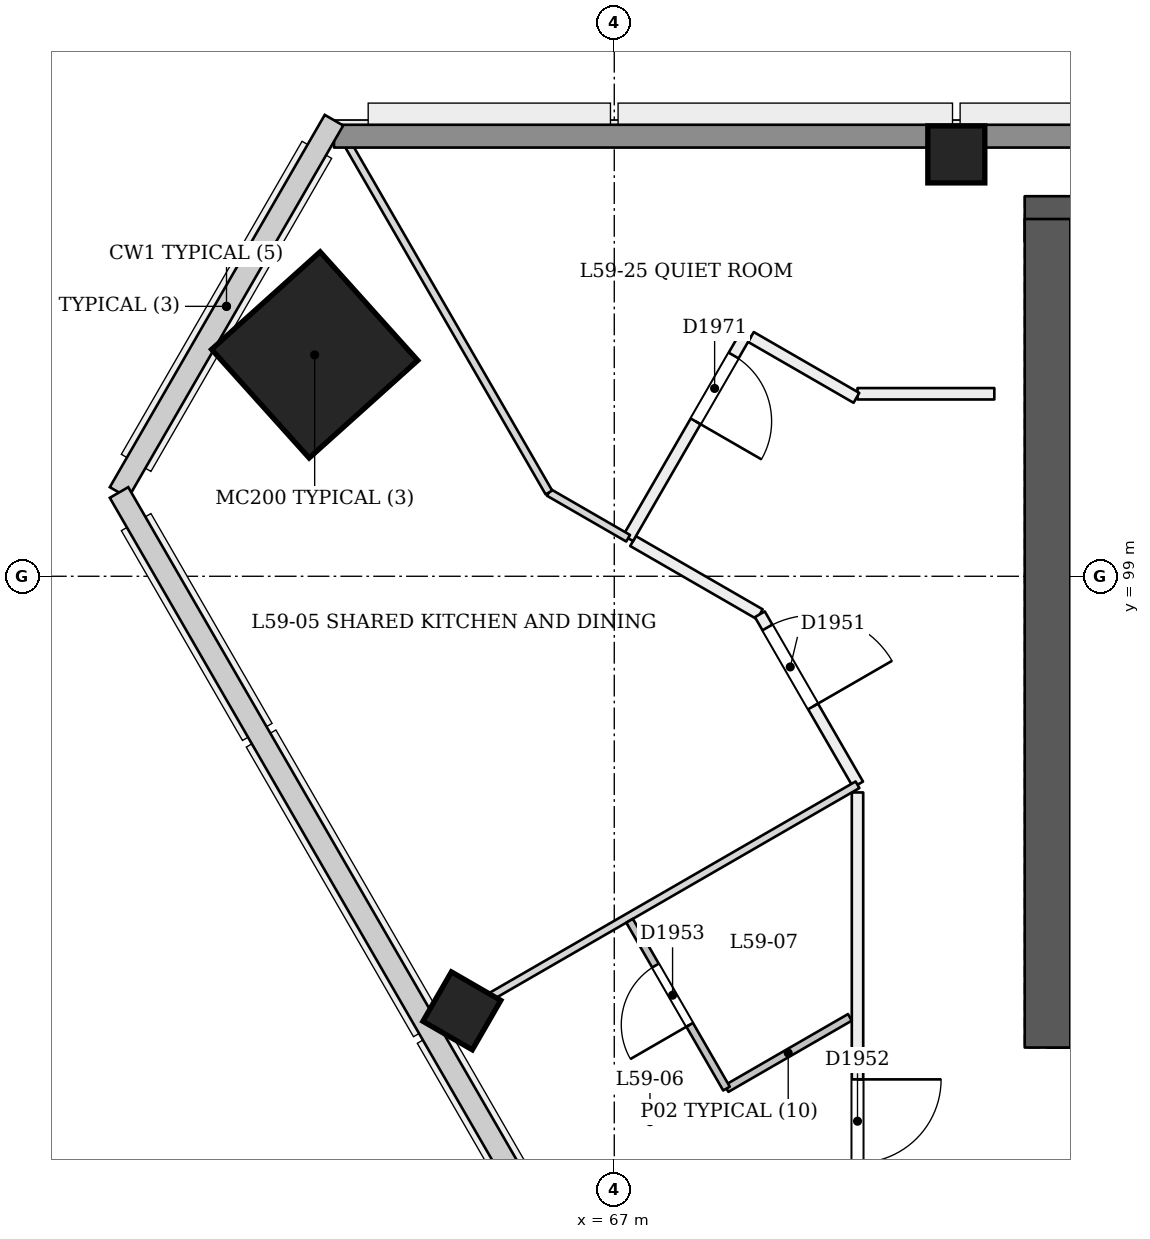
"""IFC4 building model, lengths in metres.
Left out: names, types, materials, properties, quantities, classifications, styles, units other than length and angle.
Written with IfcOpenShell. Run it as: python <this file> out.ifc"""

import sys

from ifc_helpers import new_model, si_unit, direction, frame, frame_2d, origin, origin_2d, place, context, subcontext, project, spatial, rectangle, extrude, element, fill, save


model = new_model("IFC4")
c1 = context("Model", 3, precision=1e-05, world=origin(), true_north=direction((0.0, 1.0)))
c2 = subcontext(c1, "Body", "Model", "MODEL_VIEW")
j1 = project(units=[si_unit("LENGTHUNIT", "METRE"), si_unit("PLANEANGLEUNIT", "RADIAN")], contexts=[c1])
p1 = place(None, origin())
s1 = spatial("IfcSite", under=j1, at=p1, CompositionType="ELEMENT")
p2 = place(p1, origin())
s2 = spatial("IfcBuilding", under=s1, at=p2, CompositionType="ELEMENT")
p3 = place(p2, frame((0.0, 0.0, 230.2)))
s3 = spatial("IfcBuildingStorey", under=s2, at=p3, CompositionType="ELEMENT", Elevation=230.2)
p4 = place(p3, frame((72.7, 93.1, 0.0), z_axis=(0.0, 0.0, 1.0), x_axis=(1.0, 0.0, 0.0)))
e1 = element("IfcWall", 1, at=p4, inside=s3, PredefinedType="SHEAR", context=c2, shape_type="SweptSolid", body=[
    extrude(rectangle(XDim=24.9, YDim=0.6, at=frame_2d((12.45, 0.0))), origin(), (0.0, 0.0, 1.0), 3.6),
])
p5 = place(p4, frame((1.1, 0.0, 0.0)))
e2 = element("IfcOpeningElement", 2, at=p5, cuts=e1, PredefinedType="OPENING", context=c2, shape_type="SweptSolid", body=[
    extrude(rectangle(XDim=1.2, YDim=2.1, at=frame_2d((0.6, 1.05))), frame((0.0, 0.311, 0.0), z_axis=(0.0, -1.0, 0.0), x_axis=(1.0, 0.0, 0.0)), (0.0, 0.0, 1.0), 0.621),
])
p6 = place(p4, frame((3.3, 0.0, 0.0)))
e3 = element("IfcOpeningElement", 3, at=p6, cuts=e1, PredefinedType="OPENING", context=c2, shape_type="SweptSolid", body=[
    extrude(rectangle(XDim=1.2, YDim=2.1, at=frame_2d((0.6, 1.05))), frame((0.0, 0.311, 0.0), z_axis=(0.0, -1.0, 0.0), x_axis=(1.0, 0.0, 0.0)), (0.0, 0.0, 1.0), 0.621),
])
p7 = place(p4, frame((13.3, 0.0, 0.0)))
e4 = element("IfcOpeningElement", 4, at=p7, cuts=e1, PredefinedType="OPENING", context=c2, shape_type="SweptSolid", body=[
    extrude(rectangle(XDim=1.2, YDim=2.1, at=frame_2d((0.6, 1.05))), frame((0.0, 0.311, 0.0), z_axis=(0.0, -1.0, 0.0), x_axis=(1.0, 0.0, 0.0)), (0.0, 0.0, 1.0), 0.621),
])
p8 = place(p4, frame((15.762, 0.0, 0.0)))
e5 = element("IfcOpeningElement", 5, at=p8, cuts=e1, PredefinedType="OPENING", context=c2, shape_type="SweptSolid", body=[
    extrude(rectangle(XDim=1.0, YDim=2.1, at=frame_2d((0.5, 1.05))), frame((0.0, 0.311, 0.0), z_axis=(0.0, -1.0, 0.0), x_axis=(1.0, 0.0, 0.0)), (0.0, 0.0, 1.0), 0.621),
])
p9 = place(p4, frame((18.2, 0.0, 0.0)))
e6 = element("IfcOpeningElement", 6, at=p9, cuts=e1, PredefinedType="OPENING", context=c2, shape_type="SweptSolid", body=[
    extrude(rectangle(XDim=1.0, YDim=2.1, at=frame_2d((0.5, 1.05))), frame((0.0, 0.311, 0.0), z_axis=(0.0, -1.0, 0.0), x_axis=(1.0, 0.0, 0.0)), (0.0, 0.0, 1.0), 0.621),
])
p10 = place(p4, frame((20.55, 0.0, 0.0)))
e7 = element("IfcOpeningElement", 7, at=p10, cuts=e1, PredefinedType="OPENING", context=c2, shape_type="SweptSolid", body=[
    extrude(rectangle(XDim=1.0, YDim=2.1, at=frame_2d((0.5, 1.05))), frame((0.0, 0.311, 0.0), z_axis=(0.0, -1.0, 0.0), x_axis=(1.0, 0.0, 0.0)), (0.0, 0.0, 1.0), 0.621),
])
p11 = place(p4, frame((22.837, 0.0, 0.0)))
e8 = element("IfcOpeningElement", 8, at=p11, cuts=e1, PredefinedType="OPENING", context=c2, shape_type="SweptSolid", body=[
    extrude(rectangle(XDim=1.0, YDim=2.1, at=frame_2d((0.5, 1.05))), frame((0.0, 0.311, 0.0), z_axis=(0.0, -1.0, 0.0), x_axis=(1.0, 0.0, 0.0)), (0.0, 0.0, 1.0), 0.621),
])
p12 = place(p3, frame((97.3, 103.7, 0.0), z_axis=(0.0, 0.0, 1.0), x_axis=(-1.0, 0.0, 0.0)))
e9 = element("IfcWall", 9, at=p12, inside=s3, PredefinedType="SHEAR", context=c2, shape_type="SweptSolid", body=[
    extrude(rectangle(XDim=24.9, YDim=0.6, at=frame_2d((12.45, 0.0))), origin(), (0.0, 0.0, 1.0), 3.6),
])
p13 = place(p3, frame((72.7, 103.7, 0.0), z_axis=(0.0, 0.0, 1.0), x_axis=(0.0, -1.0, 0.0)))
e10 = element("IfcWall", 10, at=p13, inside=s3, PredefinedType="SHEAR", context=c2, shape_type="SweptSolid", body=[
    extrude(rectangle(XDim=10.9, YDim=0.6, at=frame_2d((5.45, 0.0))), origin(), (0.0, 0.0, 1.0), 3.6),
])
p14 = place(p3, frame((63.024, 101.901, 0.0), z_axis=(0.028334084323, 0.009218745139, 0.999555998633), x_axis=(-0.865471577165, 0.500561960989, 0.019916634515)))
e11 = element("IfcColumn", 11, at=p14, inside=s3, PredefinedType="COLUMN", context=c2, shape_type="SweptSolid", body=[
    extrude(rectangle(XDim=1.92, YDim=1.92, at=origin_2d()), origin(), (0.0, 0.0, 1.0), 3.602),
])
p15 = place(p3, frame((71.5, 104.55, 0.0), z_axis=(0.0, 0.0, 1.0), x_axis=(1.0, 0.0, 0.0)))
e12 = element("IfcColumn", 12, at=p15, inside=s3, PredefinedType="COLUMN", context=c2, shape_type="SweptSolid", body=[
    extrude(rectangle(XDim=0.75, YDim=0.75, at=origin_2d()), origin(), (0.0, 0.0, 1.0), 3.6),
])
p16 = place(p3, frame((64.968, 93.236, -0.023), z_axis=(0.02222134892, 0.038480872521, 0.999012229206), x_axis=(-0.865639401317, -0.499186837261, 0.038482832442)))
e13 = element("IfcColumn", 13, at=p16, inside=s3, PredefinedType="COLUMN", context=c2, shape_type="SweptSolid", body=[
    extrude(rectangle(XDim=0.75, YDim=0.75, at=origin_2d()), origin(), (0.0, 0.0, 1.0), 3.604),
])
p17 = place(p3, frame((67.247, 99.463, 0.0), z_axis=(0.0, 0.0, 1.0), x_axis=(0.86605048973, -0.49995654735, 0.0)))
e14 = element("IfcWall", 14, at=p17, inside=s3, PredefinedType="PARTITIONING", context=c2, shape_type="SweptSolid", body=[
    extrude(rectangle(XDim=1.926, YDim=0.15, at=frame_2d((0.963, 0.0))), origin(), (0.0, 0.0, 1.0), 3.2),
])
p18 = place(p3, frame((68.915, 98.5, 0.0), z_axis=(0.0, 0.0, 1.0), x_axis=(0.499948666432, -0.866055039205, 0.0)))
e15 = element("IfcWall", 15, at=p18, inside=s3, PredefinedType="PARTITIONING", context=c2, shape_type="SweptSolid", body=[
    extrude(rectangle(XDim=2.585, YDim=0.15, at=frame_2d((1.292, 0.0))), origin(), (0.0, 0.0, 1.0), 3.2),
])
p19 = place(p18, frame((0.2, 0.0, 0.0)))
e16 = element("IfcOpeningElement", 16, at=p19, cuts=e15, PredefinedType="OPENING", context=c2, shape_type="SweptSolid", body=[
    extrude(rectangle(XDim=1.2, YDim=2.1, at=frame_2d((0.6, 1.05))), frame((0.0, 0.085, 0.0), z_axis=(0.0, -1.0, 0.0), x_axis=(1.0, 0.0, 0.0)), (0.0, 0.0, 1.0), 0.171),
])
p20 = place(p3, frame((70.2, 96.156, 0.0), z_axis=(0.0, 0.0, 1.0), x_axis=(0.0, -1.0, 0.0)))
e17 = element("IfcWall", 17, at=p20, inside=s3, PredefinedType="PARTITIONING", context=c2, shape_type="SweptSolid", body=[
    extrude(rectangle(XDim=5.956, YDim=0.15, at=frame_2d((2.978, 0.0))), origin(), (0.0, 0.0, 1.0), 3.2),
])
p21 = place(p20, frame((3.775, 0.0, 0.0)))
e18 = element("IfcOpeningElement", 18, at=p21, cuts=e17, PredefinedType="OPENING", context=c2, shape_type="SweptSolid", body=[
    extrude(rectangle(XDim=1.1, YDim=2.1, at=frame_2d((0.55, 1.05))), frame((0.0, 0.085, 0.0), z_axis=(0.0, -1.0, 0.0), x_axis=(1.0, 0.0, 0.0)), (0.0, 0.0, 1.0), 0.171),
])
p22 = place(p3, frame((72.0, 101.401, 0.0), z_axis=(0.0, 0.0, 1.0), x_axis=(-1.0, 0.0, 0.0)))
e19 = element("IfcWall", 19, at=p22, inside=s3, PredefinedType="PARTITIONING", context=c2, shape_type="SweptSolid", body=[
    extrude(rectangle(XDim=1.8, YDim=0.15, at=frame_2d((0.9, 0.0))), origin(), (0.0, 0.0, 1.0), 3.2),
])
p23 = place(p3, frame((70.186, 101.347, 0.0), z_axis=(0.0, 0.0, 1.0), x_axis=(-0.866106948778, 0.499858733323, 0.0)))
e20 = element("IfcWall", 20, at=p23, inside=s3, PredefinedType="PARTITIONING", context=c2, shape_type="SweptSolid", body=[
    extrude(rectangle(XDim=1.603, YDim=0.15, at=frame_2d((0.801, 0.0))), origin(), (0.0, 0.0, 1.0), 3.2),
])
p24 = place(p3, frame((68.733, 102.186, 0.0), z_axis=(0.0, 0.0, 1.0), x_axis=(-0.50007687212, -0.865981017096, 0.0)))
e21 = element("IfcWall", 21, at=p24, inside=s3, PredefinedType="PARTITIONING", context=c2, shape_type="SweptSolid", body=[
    extrude(rectangle(XDim=3.101, YDim=0.15, at=frame_2d((1.55, 0.0))), origin(), (0.0, 0.0, 1.0), 3.2),
])
p25 = place(p24, frame((0.325, 0.0, 0.0)))
e22 = element("IfcOpeningElement", 22, at=p25, cuts=e21, PredefinedType="OPENING", context=c2, shape_type="SweptSolid", body=[
    extrude(rectangle(XDim=1.0, YDim=2.1, at=frame_2d((0.5, 1.05))), frame((0.0, 0.085, 0.0), z_axis=(0.0, -1.0, 0.0), x_axis=(1.0, 0.0, 0.0)), (0.0, 0.0, 1.0), 0.171),
])
p26 = place(p3, frame((64.665, 93.062, 0.0), z_axis=(0.0, 0.0, 1.0), x_axis=(0.866027189425, 0.499996907167, 0.0)))
e23 = element("IfcWall", 23, at=p26, inside=s3, PredefinedType="PARTITIONING", context=c2, shape_type="SweptSolid", body=[
    extrude(rectangle(XDim=6.391, YDim=0.1, at=frame_2d((3.196, 0.0))), origin(), (0.0, 0.0, 1.0), 2.7),
])
p27 = place(p3, frame((67.182, 99.5, 0.0), z_axis=(0.0, 0.0, 1.0), x_axis=(-0.86599977965, 0.500044379676, 0.0)))
e24 = element("IfcWall", 24, at=p27, inside=s3, PredefinedType="PARTITIONING", context=c2, shape_type="SweptSolid", body=[
    extrude(rectangle(XDim=1.204, YDim=0.1, at=frame_2d((0.602, 0.0))), origin(), (0.0, 0.0, 1.0), 3.2),
])
p28 = place(p3, frame((66.14, 100.102, 0.0), z_axis=(0.0, 0.0, 1.0), x_axis=(-0.50001619095, 0.866016055733, 0.0)))
e25 = element("IfcWall", 25, at=p28, inside=s3, PredefinedType="PARTITIONING", context=c2, shape_type="SweptSolid", body=[
    extrude(rectangle(XDim=5.54, YDim=0.1, at=frame_2d((2.77, 0.0))), origin(), (0.0, 0.0, 1.0), 2.7),
])
p29 = place(p3, frame((70.1, 93.197, 0.0), z_axis=(0.0, 0.0, 1.0), x_axis=(-0.86599040064, -0.500060622324, 0.0)))
e26 = element("IfcWall", 26, at=p29, inside=s3, PredefinedType="PARTITIONING", context=c2, shape_type="SweptSolid", body=[
    extrude(rectangle(XDim=1.875, YDim=0.1, at=frame_2d((0.938, 0.0))), origin(), (0.0, 0.0, 1.0), 3.2),
])
p30 = place(p3, frame((68.477, 92.26, 0.0), z_axis=(0.0, 0.0, 1.0), x_axis=(-0.500020783669, 0.866013403995, 0.0)))
e27 = element("IfcWall", 27, at=p30, inside=s3, PredefinedType="PARTITIONING", context=c2, shape_type="SweptSolid", body=[
    extrude(rectangle(XDim=2.55, YDim=0.1, at=frame_2d((1.275, 0.0))), origin(), (0.0, 0.0, 1.0), 3.2),
])
p31 = place(p30, frame((0.969, 0.0, 0.0)))
e28 = element("IfcOpeningElement", 28, at=p31, cuts=e27, PredefinedType="OPENING", context=c2, shape_type="SweptSolid", body=[
    extrude(rectangle(XDim=0.9, YDim=2.1, at=frame_2d((0.45, 1.05))), frame((0.0, 0.061, 0.0), z_axis=(0.0, -1.0, 0.0), x_axis=(1.0, 0.0, 0.0)), (0.0, 0.0, 1.0), 0.121),
])
p32 = place(p3, frame((63.312, 104.79, 0.0), z_axis=(0.0, 0.0, 1.0), x_axis=(1.0, 0.0, 0.0)))
e29 = element("IfcWall", 29, at=p32, inside=s3, PredefinedType="SOLIDWALL", context=c2, shape_type="SweptSolid", body=[
    extrude(rectangle(XDim=43.375, YDim=0.3, at=frame_2d((21.688, 0.0))), origin(), (0.0, 0.0, 1.0), 2.7),
])
p33 = place(p19, origin())
e30 = element("IfcDoor", 30, at=p33, inside=s3, OperationType="SINGLE_SWING_RIGHT", PredefinedType="NOTDEFINED", context=c2, shape_type="SweptSolid", body=[
    extrude(rectangle(XDim=1.2, YDim=2.1, at=frame_2d((0.6, 1.05))), frame((0.0, 0.025, 0.0), z_axis=(0.0, -1.0, 0.0), x_axis=(1.0, 0.0, 0.0)), (0.0, 0.0, 1.0), 0.05),
])
fill(e16, e30)
p34 = place(p21, origin())
e31 = element("IfcDoor", 31, at=p34, inside=s3, OperationType="SINGLE_SWING_LEFT", PredefinedType="NOTDEFINED", context=c2, shape_type="SweptSolid", body=[
    extrude(rectangle(XDim=1.1, YDim=2.1, at=frame_2d((0.55, 1.05))), frame((0.0, 0.025, 0.0), z_axis=(0.0, -1.0, 0.0), x_axis=(1.0, 0.0, 0.0)), (0.0, 0.0, 1.0), 0.05),
])
fill(e18, e31)
p35 = place(p31, origin())
e32 = element("IfcDoor", 32, at=p35, inside=s3, OperationType="SINGLE_SWING_LEFT", PredefinedType="NOTDEFINED", context=c2, shape_type="SweptSolid", body=[
    extrude(rectangle(XDim=0.9, YDim=2.1, at=frame_2d((0.45, 1.05))), frame((0.0, 0.025, 0.0), z_axis=(0.0, -1.0, 0.0), x_axis=(1.0, 0.0, 0.0)), (0.0, 0.0, 1.0), 0.05),
])
fill(e28, e32)
p36 = place(p25, origin())
e33 = element("IfcDoor", 33, at=p36, inside=s3, OperationType="SINGLE_SWING_RIGHT", PredefinedType="NOTDEFINED", context=c2, shape_type="SweptSolid", body=[
    extrude(rectangle(XDim=1.0, YDim=2.1, at=frame_2d((0.5, 1.05))), frame((0.0, 0.025, 0.0), z_axis=(0.0, -1.0, 0.0), x_axis=(1.0, 0.0, 0.0)), (0.0, 0.0, 1.0), 0.05),
])
fill(e22, e33)
save(model, sys.argv[1])
